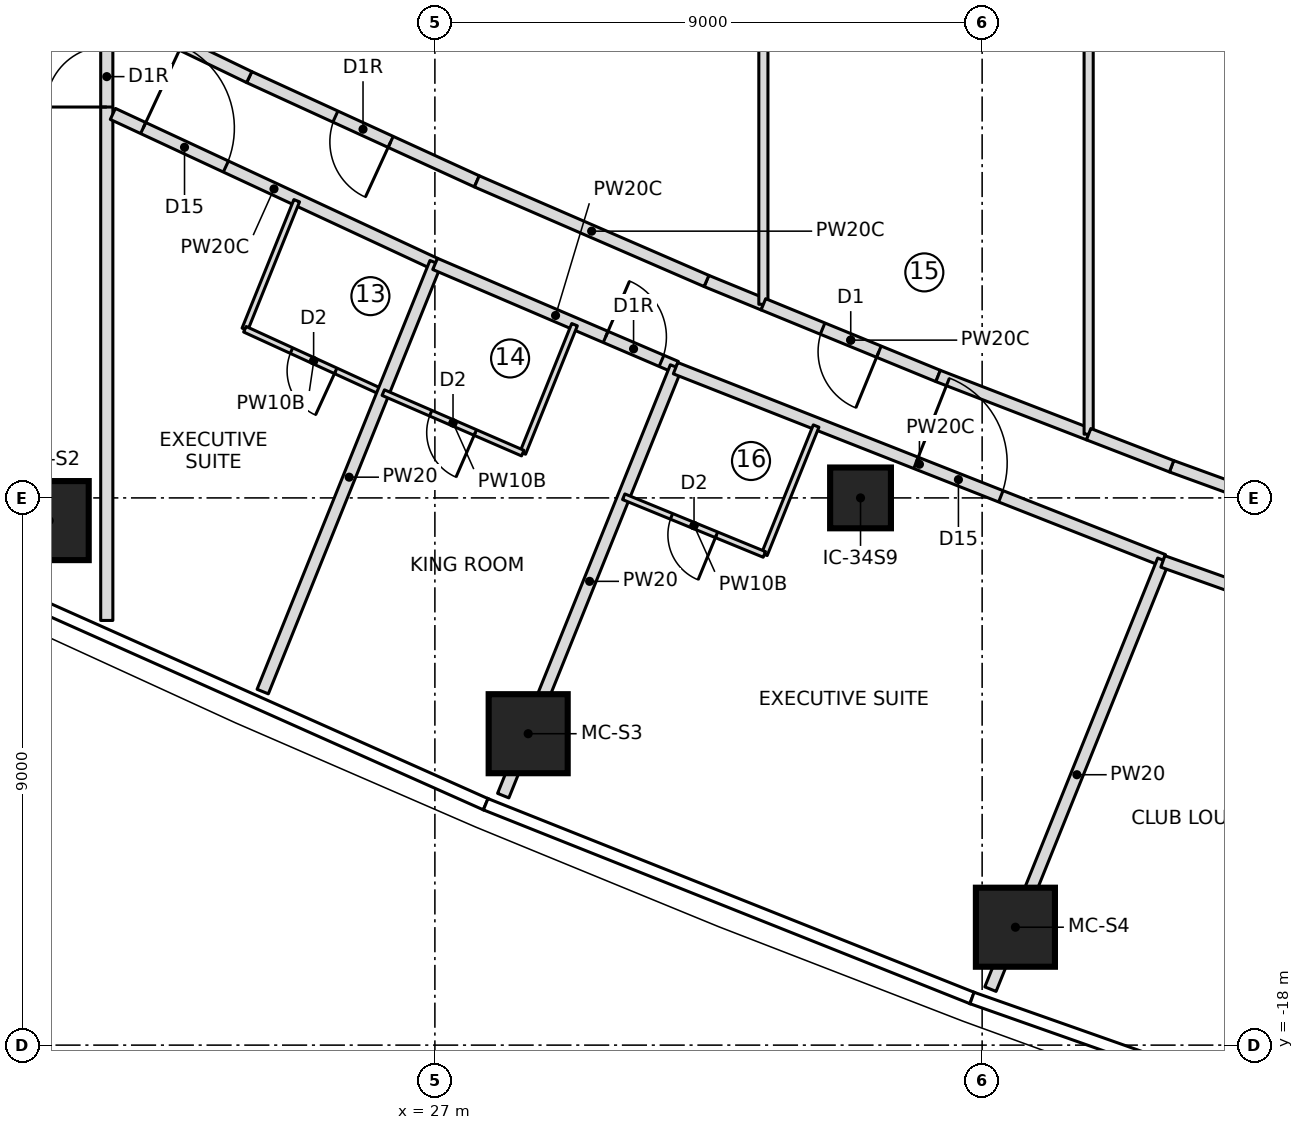
"""IFC4 building model, lengths in metres.
Left out: names, types, materials, properties, quantities, classifications, styles, units other than length and angle.
Written with IfcOpenShell. Run it as: python <this file> out.ifc"""

import sys

from ifc_helpers import new_model, si_unit, direction, frame, frame_2d, origin, origin_2d, place, context, subcontext, project, spatial, rectangle, extrude, element, fill, save


model = new_model("IFC4")
c1 = context("Model", 3, precision=1e-05, world=origin(), true_north=direction((0.0, 1.0)))
c2 = subcontext(c1, "Body", "Model", "MODEL_VIEW")
j1 = project(units=[si_unit("LENGTHUNIT", "METRE"), si_unit("PLANEANGLEUNIT", "RADIAN")], contexts=[c1])
p1 = place(None, origin())
s1 = spatial("IfcSite", under=j1, at=p1, CompositionType="ELEMENT")
p2 = place(p1, origin())
s2 = spatial("IfcBuilding", under=s1, at=p2, CompositionType="ELEMENT")
p3 = place(p2, frame((0.0, 0.0, 200.35)))
s3 = spatial("IfcBuildingStorey", under=s2, at=p3, CompositionType="ELEMENT", Elevation=200.35)
for number, where, z_axis, x_axis in (
    (1, (20.657, -9.373, 0.0), (0.0, 0.0, 1.0), (1.0, 0.0, 0.0)),
    (2, (28.534, -12.878, 0.0), (0.0, 0.0, 1.0), (1.0, 0.0, 0.0)),
    (3, (36.547, -16.061, 0.0), (0.0, 0.0, 1.0), (1.0, 0.0, 0.0)),
):
    element("IfcColumn", number, at=place(p3, frame(where, z_axis=z_axis, x_axis=x_axis)), inside=s3, PredefinedType="COLUMN", context=c2, shape_type="SweptSolid", body=[
        extrude(rectangle(XDim=1.3, YDim=1.3, at=origin_2d()), origin(), (0.0, 0.0, 1.0), 3.55),
    ])
p4 = place(p3, frame((34.0, -9.0, 0.0), z_axis=(0.0, 0.0, 1.0), x_axis=(1.0, 0.0, 0.0)))
e4 = element("IfcColumn", 4, at=p4, inside=s3, PredefinedType="COLUMN", context=c2, shape_type="SweptSolid", body=[
    extrude(rectangle(XDim=1.0, YDim=1.0, at=origin_2d()), origin(), (0.0, 0.0, 1.0), 3.55),
])
p5 = place(p3, frame((21.604, -11.015, 0.0), z_axis=(0.0, 0.0, 1.0), x_axis=(0.0, 1.0, 0.0)))
e5 = element("IfcWall", 5, at=p5, inside=s3, PredefinedType="PARTITIONING", context=c2, shape_type="SweptSolid", body=[
    extrude(rectangle(XDim=22.031, YDim=0.2, at=frame_2d((11.015, 0.0))), origin(), (0.0, 0.0, 1.0), 3.25),
])
p6 = place(p5, frame((12.586, 0.0, 0.0)))
e6 = element("IfcOpeningElement", 6, at=p6, cuts=e5, PredefinedType="OPENING", context=c2, shape_type="SweptSolid", body=[
    extrude(rectangle(XDim=1.0, YDim=2.1, at=frame_2d((0.5, 1.05))), frame((0.0, 0.11, 0.0), z_axis=(0.0, -1.0, 0.0), x_axis=(1.0, 0.0, 0.0)), (0.0, 0.0, 1.0), 0.22),
])
p7 = place(p5, frame((8.444, 0.0, 0.0)))
e7 = element("IfcOpeningElement", 7, at=p7, cuts=e5, PredefinedType="OPENING", context=c2, shape_type="SweptSolid", body=[
    extrude(rectangle(XDim=1.0, YDim=2.1, at=frame_2d((0.5, 1.05))), frame((0.0, 0.11, 0.0), z_axis=(0.0, -1.0, 0.0), x_axis=(1.0, 0.0, 0.0)), (0.0, 0.0, 1.0), 0.22),
])
p8 = place(p3, frame((21.704, -2.685, 0.0), z_axis=(0.0, 0.0, 1.0), x_axis=(0.906628613993, -0.421929563184, 0.0)))
e8 = element("IfcWall", 8, at=p8, inside=s3, PredefinedType="PARTITIONING", context=c2, shape_type="SweptSolid", body=[
    extrude(rectangle(XDim=5.846, YDim=0.2, at=frame_2d((2.923, 0.0))), origin(), (0.0, 0.0, 1.0), 3.25),
])
p9 = place(p8, frame((0.55, 0.0, 0.0)))
e9 = element("IfcOpeningElement", 9, at=p9, cuts=e8, PredefinedType="OPENING", context=c2, shape_type="SweptSolid", body=[
    extrude(rectangle(XDim=1.5, YDim=2.1, at=frame_2d((0.75, 1.05))), frame((0.0, 0.11, 0.0), z_axis=(0.0, -1.0, 0.0), x_axis=(1.0, 0.0, 0.0)), (0.0, 0.0, 1.0), 0.22),
])
p10 = place(p3, frame((23.875, -6.226, 0.0), z_axis=(0.0, 0.0, 1.0), x_axis=(0.373790023037, 0.927513352291, 0.0)))
e10 = element("IfcWall", 10, at=p10, inside=s3, PredefinedType="PARTITIONING", context=c2, shape_type="SweptSolid", body=[
    extrude(rectangle(XDim=2.28, YDim=0.1, at=frame_2d((1.14, 0.0))), origin(), (0.0, 0.0, 1.0), 3.25),
])
p11 = place(p3, frame((26.142, -7.264, 0.0), z_axis=(0.0, 0.0, 1.0), x_axis=(-0.909145169949, 0.416479363183, 0.0)))
e11 = element("IfcWall", 11, at=p11, inside=s3, PredefinedType="PARTITIONING", context=c2, shape_type="SweptSolid", body=[
    extrude(rectangle(XDim=2.493, YDim=0.1, at=frame_2d((1.247, 0.0))), origin(), (0.0, 0.0, 1.0), 3.25),
])
p12 = place(p11, frame((0.85, 0.0, 0.0)))
e12 = element("IfcOpeningElement", 12, at=p12, cuts=e11, PredefinedType="OPENING", context=c2, shape_type="SweptSolid", body=[
    extrude(rectangle(XDim=0.8, YDim=2.1, at=frame_2d((0.4, 1.05))), frame((0.0, 0.06, 0.0), z_axis=(0.0, -1.0, 0.0), x_axis=(1.0, 0.0, 0.0)), (0.0, 0.0, 1.0), 0.12),
])
p13 = place(p3, frame((24.168, -12.185, 0.0), z_axis=(0.0, 0.0, 1.0), x_axis=(0.373913547423, 0.927463562116, 0.0)))
e13 = element("IfcWall", 13, at=p13, inside=s3, PredefinedType="PARTITIONING", context=c2, shape_type="SweptSolid", body=[
    extrude(rectangle(XDim=7.604, YDim=0.2, at=frame_2d((3.802, 0.0))), origin(), (0.0, 0.0, 1.0), 3.25),
])
p14 = place(p3, frame((27.004, -5.151, 0.0), z_axis=(0.0, 0.0, 1.0), x_axis=(0.919259282109, -0.393652603519, 0.0)))
e14 = element("IfcWall", 14, at=p14, inside=s3, PredefinedType="PARTITIONING", context=c2, shape_type="SweptSolid", body=[
    extrude(rectangle(XDim=4.309, YDim=0.2, at=frame_2d((2.155, 0.0))), origin(), (0.0, 0.0, 1.0), 3.25),
])
p15 = place(p14, frame((3.05, 0.0, 0.0)))
e15 = element("IfcOpeningElement", 15, at=p15, cuts=e14, PredefinedType="OPENING", context=c2, shape_type="SweptSolid", body=[
    extrude(rectangle(XDim=1.0, YDim=2.1, at=frame_2d((0.5, 1.05))), frame((0.0, 0.11, 0.0), z_axis=(0.0, -1.0, 0.0), x_axis=(1.0, 0.0, 0.0)), (0.0, 0.0, 1.0), 0.22),
])
p16 = place(p3, frame((29.297, -6.151, 0.0), z_axis=(0.0, 0.0, 1.0), x_axis=(-0.373902898623, -0.927467855185, 0.0)))
e16 = element("IfcWall", 16, at=p16, inside=s3, PredefinedType="PARTITIONING", context=c2, shape_type="SweptSolid", body=[
    extrude(rectangle(XDim=2.278, YDim=0.1, at=frame_2d((1.139, 0.0))), origin(), (0.0, 0.0, 1.0), 3.25),
])
p17 = place(p3, frame((28.445, -8.263, 0.0), z_axis=(0.0, 0.0, 1.0), x_axis=(-0.917378641232, 0.398015613526, 0.0)))
e17 = element("IfcWall", 17, at=p17, inside=s3, PredefinedType="PARTITIONING", context=c2, shape_type="SweptSolid", body=[
    extrude(rectangle(XDim=2.501, YDim=0.1, at=frame_2d((1.25, 0.0))), origin(), (0.0, 0.0, 1.0), 3.25),
])
p18 = place(p17, frame((0.85, 0.0, 0.0)))
e18 = element("IfcOpeningElement", 18, at=p18, cuts=e17, PredefinedType="OPENING", context=c2, shape_type="SweptSolid", body=[
    extrude(rectangle(XDim=0.8, YDim=2.1, at=frame_2d((0.4, 1.05))), frame((0.0, 0.06, 0.0), z_axis=(0.0, -1.0, 0.0), x_axis=(1.0, 0.0, 0.0)), (0.0, 0.0, 1.0), 0.12),
])
p19 = place(p3, frame((28.124, -13.897, 0.0), z_axis=(0.0, 0.0, 1.0), x_axis=(0.373876084216, 0.927478664796, 0.0)))
e19 = element("IfcWall", 19, at=p19, inside=s3, PredefinedType="PARTITIONING", context=c2, shape_type="SweptSolid", body=[
    extrude(rectangle(XDim=7.6, YDim=0.2, at=frame_2d((3.8, 0.0))), origin(), (0.0, 0.0, 1.0), 3.25),
])
p20 = place(p3, frame((30.958, -6.866, 0.0), z_axis=(0.0, 0.0, 1.0), x_axis=(0.93040517394, -0.366532689274, 0.0)))
e20 = element("IfcWall", 20, at=p20, inside=s3, PredefinedType="PARTITIONING", context=c2, shape_type="SweptSolid", body=[
    extrude(rectangle(XDim=8.622, YDim=0.2, at=frame_2d((4.311, 0.0))), origin(), (0.0, 0.0, 1.0), 3.25),
])
p21 = place(p20, frame((4.25, 0.0, 0.0)))
e21 = element("IfcOpeningElement", 21, at=p21, cuts=e20, PredefinedType="OPENING", context=c2, shape_type="SweptSolid", body=[
    extrude(rectangle(XDim=1.5, YDim=2.1, at=frame_2d((0.75, 1.05))), frame((0.0, 0.11, 0.0), z_axis=(0.0, -1.0, 0.0), x_axis=(1.0, 0.0, 0.0)), (0.0, 0.0, 1.0), 0.22),
])
p22 = place(p3, frame((33.27, -7.818, 0.0), z_axis=(0.0, 0.0, 1.0), x_axis=(-0.373847853912, -0.927490044219, 0.0)))
e22 = element("IfcWall", 22, at=p22, inside=s3, PredefinedType="PARTITIONING", context=c2, shape_type="SweptSolid", body=[
    extrude(rectangle(XDim=2.277, YDim=0.1, at=frame_2d((1.139, 0.0))), origin(), (0.0, 0.0, 1.0), 3.25),
])
p23 = place(p3, frame((32.418, -9.93, 0.0), z_axis=(0.0, 0.0, 1.0), x_axis=(-0.92519499486, 0.379492057212, 0.0)))
e23 = element("IfcWall", 23, at=p23, inside=s3, PredefinedType="PARTITIONING", context=c2, shape_type="SweptSolid", body=[
    extrude(rectangle(XDim=2.5, YDim=0.1, at=frame_2d((1.25, 0.0))), origin(), (0.0, 0.0, 1.0), 3.25),
])
p24 = place(p23, frame((0.85, 0.0, 0.0)))
e24 = element("IfcOpeningElement", 24, at=p24, cuts=e23, PredefinedType="OPENING", context=c2, shape_type="SweptSolid", body=[
    extrude(rectangle(XDim=0.8, YDim=2.1, at=frame_2d((0.4, 1.05))), frame((0.0, 0.06, 0.0), z_axis=(0.0, -1.0, 0.0), x_axis=(1.0, 0.0, 0.0)), (0.0, 0.0, 1.0), 0.12),
])
p25 = place(p3, frame((36.137, -17.079, 0.0), z_axis=(0.0, 0.0, 1.0), x_axis=(0.373863662938, 0.927483671843, 0.0)))
e25 = element("IfcWall", 25, at=p25, inside=s3, PredefinedType="PARTITIONING", context=c2, shape_type="SweptSolid", body=[
    extrude(rectangle(XDim=7.604, YDim=0.2, at=frame_2d((3.802, 0.0))), origin(), (0.0, 0.0, 1.0), 3.25),
])
p26 = place(p3, frame((38.972, -10.045, 0.0), z_axis=(0.0, 0.0, 1.0), x_axis=(0.942220252757, -0.334994022773, 0.0)))
e26 = element("IfcWall", 26, at=p26, inside=s3, PredefinedType="PARTITIONING", context=c2, shape_type="SweptSolid", body=[
    extrude(rectangle(XDim=4.31, YDim=0.2, at=frame_2d((2.155, 0.0))), origin(), (0.0, 0.0, 1.0), 3.25),
])
p27 = place(p26, frame((1.655, 0.0, 0.0)))
e27 = element("IfcOpeningElement", 27, at=p27, cuts=e26, PredefinedType="OPENING", context=c2, shape_type="SweptSolid", body=[
    extrude(rectangle(XDim=2.0, YDim=2.4, at=frame_2d((1.0, 1.2))), frame((0.0, 0.11, 0.0), z_axis=(0.0, -1.0, 0.0), x_axis=(1.0, 0.0, 0.0)), (0.0, 0.0, 1.0), 0.22),
])
p28 = place(p3, frame((27.69, -3.793, 0.0), z_axis=(0.0, 0.0, 1.0), x_axis=(-0.909180834404, 0.416401501382, 0.0)))
e28 = element("IfcWall", 28, at=p28, inside=s3, PredefinedType="PARTITIONING", context=c2, shape_type="SweptSolid", body=[
    extrude(rectangle(XDim=4.117, YDim=0.2, at=frame_2d((2.059, 0.0))), origin(), (0.0, 0.0, 1.0), 3.25),
])
p29 = place(p28, frame((1.559, 0.0, 0.0)))
e29 = element("IfcOpeningElement", 29, at=p29, cuts=e28, PredefinedType="OPENING", context=c2, shape_type="SweptSolid", body=[
    extrude(rectangle(XDim=1.0, YDim=2.1, at=frame_2d((0.5, 1.05))), frame((0.0, 0.11, 0.0), z_axis=(0.0, -1.0, 0.0), x_axis=(1.0, 0.0, 0.0)), (0.0, 0.0, 1.0), 0.22),
])
p30 = place(p3, frame((32.402, -5.816, 0.0), z_axis=(0.0, 0.0, 1.0), x_axis=(-0.925212079844, 0.379450401648, 0.0)))
e30 = element("IfcWall", 30, at=p30, inside=s3, PredefinedType="PARTITIONING", context=c2, shape_type="SweptSolid", body=[
    extrude(rectangle(XDim=1.011, YDim=0.2, at=frame_2d((0.506, 0.0))), origin(), (0.0, 0.0, 1.0), 3.25),
])
p31 = place(p3, frame((31.467, -5.432, 0.0), z_axis=(0.0, 0.0, 1.0), x_axis=(-0.917375244839, 0.398023441717, 0.0)))
e31 = element("IfcWall", 31, at=p31, inside=s3, PredefinedType="PARTITIONING", context=c2, shape_type="SweptSolid", body=[
    extrude(rectangle(XDim=4.117, YDim=0.2, at=frame_2d((2.059, 0.0))), origin(), (0.0, 0.0, 1.0), 3.25),
])
p32 = place(p3, frame((23.947, -2.079, 0.0), z_axis=(0.0, 0.0, 1.0), x_axis=(-0.900633695148, 0.434579045933, 0.0)))
e32 = element("IfcWall", 32, at=p32, inside=s3, PredefinedType="PARTITIONING", context=c2, shape_type="SweptSolid", body=[
    extrude(rectangle(XDim=2.49, YDim=0.2, at=frame_2d((1.245, 0.0))), origin(), (0.0, 0.0, 1.0), 3.25),
])
p33 = place(p3, frame((32.402, -5.816, 0.0), z_axis=(0.0, 0.0, 1.0), x_axis=(0.0, 1.0, 0.0)))
e33 = element("IfcWall", 33, at=p33, inside=s3, PredefinedType="PARTITIONING", context=c2, shape_type="SweptSolid", body=[
    extrude(rectangle(XDim=11.632, YDim=0.15, at=frame_2d((5.816, 0.0))), origin(), (0.0, 0.0, 1.0), 3.25),
])
p34 = place(p3, frame((35.276, -6.994, 0.0), z_axis=(0.0, 0.0, 1.0), x_axis=(-0.925204713675, 0.379468362045, 0.0)))
e34 = element("IfcWall", 34, at=p34, inside=s3, PredefinedType="PARTITIONING", context=c2, shape_type="SweptSolid", body=[
    extrude(rectangle(XDim=3.105, YDim=0.2, at=frame_2d((1.553, 0.0))), origin(), (0.0, 0.0, 1.0), 3.25),
])
p35 = place(p34, frame((1.053, 0.0, 0.0)))
e35 = element("IfcOpeningElement", 35, at=p35, cuts=e34, PredefinedType="OPENING", context=c2, shape_type="SweptSolid", body=[
    extrude(rectangle(XDim=1.0, YDim=2.1, at=frame_2d((0.5, 1.05))), frame((0.0, 0.11, 0.0), z_axis=(0.0, -1.0, 0.0), x_axis=(1.0, 0.0, 0.0)), (0.0, 0.0, 1.0), 0.22),
])
p36 = place(p3, frame((37.752, -7.952, 0.0), z_axis=(0.0, 0.0, 1.0), x_axis=(-0.932689885878, 0.360679326801, 0.0)))
e36 = element("IfcWall", 36, at=p36, inside=s3, PredefinedType="PARTITIONING", context=c2, shape_type="SweptSolid", body=[
    extrude(rectangle(XDim=2.655, YDim=0.2, at=frame_2d((1.327, 0.0))), origin(), (0.0, 0.0, 1.0), 3.25),
])
p37 = place(p3, frame((37.752, -7.952, 0.0), z_axis=(0.0, 0.0, 1.0), x_axis=(0.0, 1.0, 0.0)))
e37 = element("IfcWall", 37, at=p37, inside=s3, PredefinedType="PARTITIONING", context=c2, shape_type="SweptSolid", body=[
    extrude(rectangle(XDim=15.904, YDim=0.15, at=frame_2d((7.952, 0.0))), origin(), (0.0, 0.0, 1.0), 3.25),
])
p38 = place(p3, frame((42.984, -9.887, 0.0), z_axis=(0.0, 0.0, 1.0), x_axis=(-0.939727613335, 0.341923986779, 0.0)))
e38 = element("IfcWall", 38, at=p38, inside=s3, PredefinedType="PARTITIONING", context=c2, shape_type="SweptSolid", body=[
    extrude(rectangle(XDim=4.117, YDim=0.2, at=frame_2d((2.059, 0.0))), origin(), (0.0, 0.0, 1.0), 3.25),
])
p39 = place(p3, frame((39.115, -8.479, 0.0), z_axis=(0.0, 0.0, 1.0), x_axis=(-0.932642417559, 0.360802052335, 0.0)))
e39 = element("IfcWall", 39, at=p39, inside=s3, PredefinedType="PARTITIONING", context=c2, shape_type="SweptSolid", body=[
    extrude(rectangle(XDim=1.462, YDim=0.2, at=frame_2d((0.731, 0.0))), origin(), (0.0, 0.0, 1.0), 3.25),
])
p40 = place(p7, origin())
e40 = element("IfcDoor", 40, at=p40, inside=s3, OperationType="SINGLE_SWING_RIGHT", PredefinedType="DOOR", context=c2, shape_type="SweptSolid", body=[
    extrude(rectangle(XDim=1.0, YDim=2.1, at=frame_2d((0.5, 1.05))), frame((0.0, 0.025, 0.0), z_axis=(0.0, -1.0, 0.0), x_axis=(1.0, 0.0, 0.0)), (0.0, 0.0, 1.0), 0.05),
])
fill(e7, e40)
p41 = place(p12, origin())
e41 = element("IfcDoor", 41, at=p41, inside=s3, OperationType="SINGLE_SWING_LEFT", PredefinedType="DOOR", context=c2, shape_type="SweptSolid", body=[
    extrude(rectangle(XDim=0.8, YDim=2.1, at=frame_2d((0.4, 1.05))), frame((0.0, 0.025, 0.0), z_axis=(0.0, -1.0, 0.0), x_axis=(1.0, 0.0, 0.0)), (0.0, 0.0, 1.0), 0.05),
])
fill(e12, e41)
p42 = place(p9, origin())
e42 = element("IfcDoor", 42, at=p42, inside=s3, OperationType="DOUBLE_DOOR_SINGLE_SWING", PredefinedType="DOOR", context=c2, shape_type="SweptSolid", body=[
    extrude(rectangle(XDim=1.5, YDim=2.1, at=frame_2d((0.75, 1.05))), frame((0.0, 0.025, 0.0), z_axis=(0.0, -1.0, 0.0), x_axis=(1.0, 0.0, 0.0)), (0.0, 0.0, 1.0), 0.05),
])
fill(e9, e42)
p43 = place(p18, origin())
e43 = element("IfcDoor", 43, at=p43, inside=s3, OperationType="SINGLE_SWING_LEFT", PredefinedType="DOOR", context=c2, shape_type="SweptSolid", body=[
    extrude(rectangle(XDim=0.8, YDim=2.1, at=frame_2d((0.4, 1.05))), frame((0.0, 0.025, 0.0), z_axis=(0.0, -1.0, 0.0), x_axis=(1.0, 0.0, 0.0)), (0.0, 0.0, 1.0), 0.05),
])
fill(e18, e43)
p44 = place(p15, origin())
e44 = element("IfcDoor", 44, at=p44, inside=s3, OperationType="SINGLE_SWING_RIGHT", PredefinedType="DOOR", context=c2, shape_type="SweptSolid", body=[
    extrude(rectangle(XDim=1.0, YDim=2.1, at=frame_2d((0.5, 1.05))), frame((0.0, 0.025, 0.0), z_axis=(0.0, -1.0, 0.0), x_axis=(1.0, 0.0, 0.0)), (0.0, 0.0, 1.0), 0.05),
])
fill(e15, e44)
p45 = place(p24, origin())
e45 = element("IfcDoor", 45, at=p45, inside=s3, OperationType="SINGLE_SWING_LEFT", PredefinedType="DOOR", context=c2, shape_type="SweptSolid", body=[
    extrude(rectangle(XDim=0.8, YDim=2.1, at=frame_2d((0.4, 1.05))), frame((0.0, 0.025, 0.0), z_axis=(0.0, -1.0, 0.0), x_axis=(1.0, 0.0, 0.0)), (0.0, 0.0, 1.0), 0.05),
])
fill(e24, e45)
p46 = place(p21, origin())
e46 = element("IfcDoor", 46, at=p46, inside=s3, OperationType="DOUBLE_DOOR_SINGLE_SWING", PredefinedType="DOOR", context=c2, shape_type="SweptSolid", body=[
    extrude(rectangle(XDim=1.5, YDim=2.1, at=frame_2d((0.75, 1.05))), frame((0.0, 0.025, 0.0), z_axis=(0.0, -1.0, 0.0), x_axis=(1.0, 0.0, 0.0)), (0.0, 0.0, 1.0), 0.05),
])
fill(e21, e46)
p47 = place(p29, origin())
e47 = element("IfcDoor", 47, at=p47, inside=s3, OperationType="SINGLE_SWING_RIGHT", PredefinedType="DOOR", context=c2, shape_type="SweptSolid", body=[
    extrude(rectangle(XDim=1.0, YDim=2.1, at=frame_2d((0.5, 1.05))), frame((0.0, 0.025, 0.0), z_axis=(0.0, -1.0, 0.0), x_axis=(1.0, 0.0, 0.0)), (0.0, 0.0, 1.0), 0.05),
])
fill(e29, e47)
p48 = place(p35, origin())
e48 = element("IfcDoor", 48, at=p48, inside=s3, OperationType="SINGLE_SWING_LEFT", PredefinedType="DOOR", context=c2, shape_type="SweptSolid", body=[
    extrude(rectangle(XDim=1.0, YDim=2.1, at=frame_2d((0.5, 1.05))), frame((0.0, 0.025, 0.0), z_axis=(0.0, -1.0, 0.0), x_axis=(1.0, 0.0, 0.0)), (0.0, 0.0, 1.0), 0.05),
])
fill(e35, e48)
save(model, sys.argv[1])
